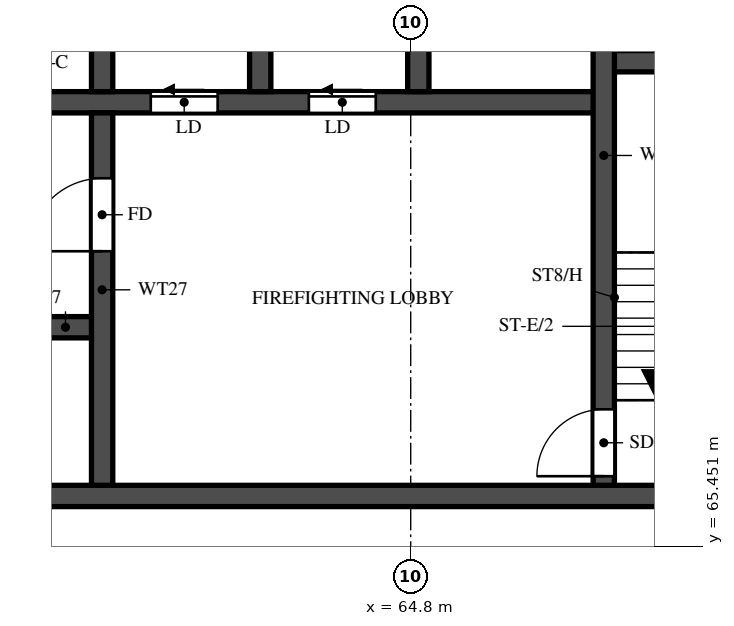
"""IFC4 building model, lengths in metres.
Left out: names, types, materials, properties, quantities, classifications, styles, units other than length and angle.
Written with IfcOpenShell. Run it as: python <this file> out.ifc"""

import sys

from ifc_helpers import new_model, si_unit, direction, frame, frame_2d, origin, place, context, subcontext, project, spatial, rectangle, extrude, element, fill, save


model = new_model("IFC4")
c1 = context("Model", 3, precision=1e-05, world=origin(), true_north=direction((0.0, 1.0)))
c2 = subcontext(c1, "Body", "Model", "MODEL_VIEW")
j1 = project(units=[si_unit("LENGTHUNIT", "METRE"), si_unit("PLANEANGLEUNIT", "RADIAN")], contexts=[c1])
p1 = place(None, origin())
s1 = spatial("IfcSite", under=j1, at=p1, CompositionType="ELEMENT")
p2 = place(p1, origin())
s2 = spatial("IfcBuilding", under=s1, at=p2, CompositionType="ELEMENT")
p3 = place(p2, frame((0.0, 0.0, 188.5)))
s3 = spatial("IfcBuildingStorey", under=s2, at=p3, CompositionType="ELEMENT", Elevation=188.5)
p4 = place(p3, frame((29.7, 66.275, 0.0), z_axis=(0.0, 0.0, 1.0), x_axis=(1.0, 0.0, 0.0)))
e1 = element("IfcWall", 1, at=p4, inside=s3, PredefinedType="SHEAR", context=c2, shape_type="SweptSolid", body=[
    extrude(rectangle(XDim=41.4, YDim=0.35, at=frame_2d((20.7, 0.0))), origin(), (0.0, 0.0, 1.0), 3.2),
])
p5 = place(p4, frame((0.925, 0.0, 0.0)))
e2 = element("IfcOpeningElement", 2, at=p5, cuts=e1, PredefinedType="OPENING", context=c2, shape_type="SweptSolid", body=[
    extrude(rectangle(XDim=1.1, YDim=2.1, at=frame_2d((0.55, 1.05))), frame((0.0, 0.185, 0.0), z_axis=(0.0, -1.0, 0.0), x_axis=(1.0, 0.0, 0.0)), (0.0, 0.0, 1.0), 0.37),
])
p6 = place(p4, frame((3.712, 0.0, 0.0)))
e3 = element("IfcOpeningElement", 3, at=p6, cuts=e1, PredefinedType="OPENING", context=c2, shape_type="SweptSolid", body=[
    extrude(rectangle(XDim=1.8, YDim=2.1, at=frame_2d((0.9, 1.05))), frame((0.0, 0.185, 0.0), z_axis=(0.0, -1.0, 0.0), x_axis=(1.0, 0.0, 0.0)), (0.0, 0.0, 1.0), 0.37),
])
p7 = place(p3, frame((35.625, 69.05, 0.0), z_axis=(0.0, 0.0, 1.0), x_axis=(1.0, 0.0, 0.0)))
e4 = element("IfcWall", 4, at=p7, inside=s3, PredefinedType="SHEAR", context=c2, shape_type="SweptSolid", body=[
    extrude(rectangle(XDim=24.1, YDim=0.35, at=frame_2d((12.05, 0.0))), origin(), (0.0, 0.0, 1.0), 3.2),
])
p8 = place(p7, frame((1.0, 0.0, 0.0)))
e5 = element("IfcOpeningElement", 5, at=p8, cuts=e4, PredefinedType="OPENING", context=c2, shape_type="SweptSolid", body=[
    extrude(rectangle(XDim=1.1, YDim=2.1, at=frame_2d((0.55, 1.05))), frame((0.0, 0.185, 0.0), z_axis=(0.0, -1.0, 0.0), x_axis=(1.0, 0.0, 0.0)), (0.0, 0.0, 1.0), 0.37),
])
p9 = place(p7, frame((3.75, 0.0, 0.0)))
e6 = element("IfcOpeningElement", 6, at=p9, cuts=e4, PredefinedType="OPENING", context=c2, shape_type="SweptSolid", body=[
    extrude(rectangle(XDim=1.1, YDim=2.1, at=frame_2d((0.55, 1.05))), frame((0.0, 0.185, 0.0), z_axis=(0.0, -1.0, 0.0), x_axis=(1.0, 0.0, 0.0)), (0.0, 0.0, 1.0), 0.37),
])
p10 = place(p7, frame((6.5, 0.0, 0.0)))
e7 = element("IfcOpeningElement", 7, at=p10, cuts=e4, PredefinedType="OPENING", context=c2, shape_type="SweptSolid", body=[
    extrude(rectangle(XDim=1.1, YDim=2.1, at=frame_2d((0.55, 1.05))), frame((0.0, 0.185, 0.0), z_axis=(0.0, -1.0, 0.0), x_axis=(1.0, 0.0, 0.0)), (0.0, 0.0, 1.0), 0.37),
])
p11 = place(p7, frame((9.25, 0.0, 0.0)))
e8 = element("IfcOpeningElement", 8, at=p11, cuts=e4, PredefinedType="OPENING", context=c2, shape_type="SweptSolid", body=[
    extrude(rectangle(XDim=1.1, YDim=2.1, at=frame_2d((0.55, 1.05))), frame((0.0, 0.185, 0.0), z_axis=(0.0, -1.0, 0.0), x_axis=(1.0, 0.0, 0.0)), (0.0, 0.0, 1.0), 0.37),
])
p12 = place(p7, frame((12.0, 0.0, 0.0)))
e9 = element("IfcOpeningElement", 9, at=p12, cuts=e4, PredefinedType="OPENING", context=c2, shape_type="SweptSolid", body=[
    extrude(rectangle(XDim=1.1, YDim=2.1, at=frame_2d((0.55, 1.05))), frame((0.0, 0.185, 0.0), z_axis=(0.0, -1.0, 0.0), x_axis=(1.0, 0.0, 0.0)), (0.0, 0.0, 1.0), 0.37),
])
p13 = place(p7, frame((14.75, 0.0, 0.0)))
e10 = element("IfcOpeningElement", 10, at=p13, cuts=e4, PredefinedType="OPENING", context=c2, shape_type="SweptSolid", body=[
    extrude(rectangle(XDim=1.1, YDim=2.1, at=frame_2d((0.55, 1.05))), frame((0.0, 0.185, 0.0), z_axis=(0.0, -1.0, 0.0), x_axis=(1.0, 0.0, 0.0)), (0.0, 0.0, 1.0), 0.37),
])
p14 = place(p7, frame((17.625, 0.0, 0.0)))
e11 = element("IfcOpeningElement", 11, at=p14, cuts=e4, PredefinedType="OPENING", context=c2, shape_type="SweptSolid", body=[
    extrude(rectangle(XDim=1.1, YDim=2.1, at=frame_2d((0.55, 1.05))), frame((0.0, 0.185, 0.0), z_axis=(0.0, -1.0, 0.0), x_axis=(1.0, 0.0, 0.0)), (0.0, 0.0, 1.0), 0.37),
])
p15 = place(p7, frame((20.625, 0.0, 0.0)))
e12 = element("IfcOpeningElement", 12, at=p15, cuts=e4, PredefinedType="OPENING", context=c2, shape_type="SweptSolid", body=[
    extrude(rectangle(XDim=1.1, YDim=2.1, at=frame_2d((0.55, 1.05))), frame((0.0, 0.185, 0.0), z_axis=(0.0, -1.0, 0.0), x_axis=(1.0, 0.0, 0.0)), (0.0, 0.0, 1.0), 0.37),
])
p16 = place(p3, frame((32.825, 72.75, 0.0), z_axis=(0.0, 0.0, 1.0), x_axis=(1.0, 0.0, 0.0)))
e13 = element("IfcWall", 13, at=p16, inside=s3, PredefinedType="SHEAR", context=c2, shape_type="SweptSolid", body=[
    extrude(rectangle(XDim=35.15, YDim=0.35, at=frame_2d((17.575, 0.0))), origin(), (0.0, 0.0, 1.0), 3.2),
])
p17 = place(p16, frame((19.8, 0.0, 0.0)))
e14 = element("IfcOpeningElement", 14, at=p17, cuts=e13, PredefinedType="OPENING", context=c2, shape_type="SweptSolid", body=[
    extrude(rectangle(XDim=1.1, YDim=2.1, at=frame_2d((0.55, 1.05))), frame((0.0, 0.185, 0.0), z_axis=(0.0, -1.0, 0.0), x_axis=(1.0, 0.0, 0.0)), (0.0, 0.0, 1.0), 0.37),
])
p18 = place(p16, frame((27.7, 0.0, 0.0)))
e15 = element("IfcOpeningElement", 15, at=p18, cuts=e13, PredefinedType="OPENING", context=c2, shape_type="SweptSolid", body=[
    extrude(rectangle(XDim=1.1, YDim=2.1, at=frame_2d((0.55, 1.05))), frame((0.0, 0.185, 0.0), z_axis=(0.0, -1.0, 0.0), x_axis=(1.0, 0.0, 0.0)), (0.0, 0.0, 1.0), 0.37),
])
p19 = place(p16, frame((30.3, 0.0, 0.0)))
e16 = element("IfcOpeningElement", 16, at=p19, cuts=e13, PredefinedType="OPENING", context=c2, shape_type="SweptSolid", body=[
    extrude(rectangle(XDim=1.1, YDim=2.1, at=frame_2d((0.55, 1.05))), frame((0.0, 0.185, 0.0), z_axis=(0.0, -1.0, 0.0), x_axis=(1.0, 0.0, 0.0)), (0.0, 0.0, 1.0), 0.37),
])
p20 = place(p16, frame((3.8, 0.0, 0.0)))
e17 = element("IfcOpeningElement", 17, at=p20, cuts=e13, PredefinedType="OPENING", context=c2, shape_type="SweptSolid", body=[
    extrude(rectangle(XDim=1.1, YDim=2.1, at=frame_2d((0.55, 1.05))), frame((0.0, 0.185, 0.0), z_axis=(0.0, -1.0, 0.0), x_axis=(1.0, 0.0, 0.0)), (0.0, 0.0, 1.0), 0.37),
])
p21 = place(p16, frame((6.55, 0.0, 0.0)))
e18 = element("IfcOpeningElement", 18, at=p21, cuts=e13, PredefinedType="OPENING", context=c2, shape_type="SweptSolid", body=[
    extrude(rectangle(XDim=1.1, YDim=2.1, at=frame_2d((0.55, 1.05))), frame((0.0, 0.185, 0.0), z_axis=(0.0, -1.0, 0.0), x_axis=(1.0, 0.0, 0.0)), (0.0, 0.0, 1.0), 0.37),
])
p22 = place(p16, frame((9.3, 0.0, 0.0)))
e19 = element("IfcOpeningElement", 19, at=p22, cuts=e13, PredefinedType="OPENING", context=c2, shape_type="SweptSolid", body=[
    extrude(rectangle(XDim=1.1, YDim=2.1, at=frame_2d((0.55, 1.05))), frame((0.0, 0.185, 0.0), z_axis=(0.0, -1.0, 0.0), x_axis=(1.0, 0.0, 0.0)), (0.0, 0.0, 1.0), 0.37),
])
p23 = place(p16, frame((12.05, 0.0, 0.0)))
e20 = element("IfcOpeningElement", 20, at=p23, cuts=e13, PredefinedType="OPENING", context=c2, shape_type="SweptSolid", body=[
    extrude(rectangle(XDim=1.1, YDim=2.1, at=frame_2d((0.55, 1.05))), frame((0.0, 0.185, 0.0), z_axis=(0.0, -1.0, 0.0), x_axis=(1.0, 0.0, 0.0)), (0.0, 0.0, 1.0), 0.37),
])
p24 = place(p16, frame((14.8, 0.0, 0.0)))
e21 = element("IfcOpeningElement", 21, at=p24, cuts=e13, PredefinedType="OPENING", context=c2, shape_type="SweptSolid", body=[
    extrude(rectangle(XDim=1.1, YDim=2.1, at=frame_2d((0.55, 1.05))), frame((0.0, 0.185, 0.0), z_axis=(0.0, -1.0, 0.0), x_axis=(1.0, 0.0, 0.0)), (0.0, 0.0, 1.0), 0.37),
])
p25 = place(p16, frame((17.55, 0.0, 0.0)))
e22 = element("IfcOpeningElement", 22, at=p25, cuts=e13, PredefinedType="OPENING", context=c2, shape_type="SweptSolid", body=[
    extrude(rectangle(XDim=1.1, YDim=2.1, at=frame_2d((0.55, 1.05))), frame((0.0, 0.185, 0.0), z_axis=(0.0, -1.0, 0.0), x_axis=(1.0, 0.0, 0.0)), (0.0, 0.0, 1.0), 0.37),
])
p26 = place(p16, frame((0.938, 0.0, 0.0)))
e23 = element("IfcOpeningElement", 23, at=p26, cuts=e13, PredefinedType="OPENING", context=c2, shape_type="SweptSolid", body=[
    extrude(rectangle(XDim=1.1, YDim=2.1, at=frame_2d((0.55, 1.05))), frame((0.0, 0.185, 0.0), z_axis=(0.0, -1.0, 0.0), x_axis=(1.0, 0.0, 0.0)), (0.0, 0.0, 1.0), 0.37),
])
p27 = place(p3, frame((67.975, 73.425, 0.0), z_axis=(0.0, 0.0, 1.0), x_axis=(1.0, 0.0, 0.0)))
e24 = element("IfcWall", 24, at=p27, inside=s3, PredefinedType="SHEAR", context=c2, shape_type="SweptSolid", body=[
    extrude(rectangle(XDim=3.125, YDim=0.35, at=frame_2d((1.562, 0.0))), origin(), (0.0, 0.0, 1.0), 3.2),
])
p28 = place(p3, frame((67.975, 66.45, 0.0), z_axis=(0.0, 0.0, 1.0), x_axis=(0.0, 1.0, 0.0)))
e25 = element("IfcWall", 25, at=p28, inside=s3, PredefinedType="SHEAR", context=c2, shape_type="SweptSolid", body=[
    extrude(rectangle(XDim=10.85, YDim=0.35, at=frame_2d((5.425, 0.0))), origin(), (0.0, 0.0, 1.0), 3.2),
])
p29 = place(p28, frame((0.15, 0.0, 0.0)))
e26 = element("IfcOpeningElement", 26, at=p29, cuts=e25, PredefinedType="OPENING", context=c2, shape_type="SweptSolid", body=[
    extrude(rectangle(XDim=1.1, YDim=2.1, at=frame_2d((0.55, 1.05))), frame((0.0, 0.185, 0.0), z_axis=(0.0, -1.0, 0.0), x_axis=(1.0, 0.0, 0.0)), (0.0, 0.0, 1.0), 0.37),
])
p30 = place(p3, frame((59.725, 66.45, 0.0), z_axis=(0.0, 0.0, 1.0), x_axis=(0.0, 1.0, 0.0)))
e27 = element("IfcWall", 27, at=p30, inside=s3, PredefinedType="SHEAR", context=c2, shape_type="SweptSolid", body=[
    extrude(rectangle(XDim=6.125, YDim=0.35, at=frame_2d((3.062, 0.0))), origin(), (0.0, 0.0, 1.0), 3.2),
])
p31 = place(p30, frame((3.85, 0.0, 0.0)))
e28 = element("IfcOpeningElement", 28, at=p31, cuts=e27, PredefinedType="OPENING", context=c2, shape_type="SweptSolid", body=[
    extrude(rectangle(XDim=1.2, YDim=2.1, at=frame_2d((0.6, 1.05))), frame((0.0, 0.185, 0.0), z_axis=(0.0, -1.0, 0.0), x_axis=(1.0, 0.0, 0.0)), (0.0, 0.0, 1.0), 0.37),
])
for number, where, z_axis, x_axis in (
    (29, (59.725, 72.925, 0.0), (0.0, 0.0, 1.0), (0.0, 1.0, 0.0)),
    (30, (62.325, 72.925, 0.0), (0.0, 0.0, 1.0), (0.0, 1.0, 0.0)),
    (31, (64.925, 72.925, 0.0), (0.0, 0.0, 1.0), (0.0, 1.0, 0.0)),
):
    element("IfcWall", number, at=place(p3, frame(where, z_axis=z_axis, x_axis=x_axis)), inside=s3, PredefinedType="SHEAR", context=c2, shape_type="SweptSolid", body=[
        extrude(rectangle(XDim=2.95, YDim=0.35, at=frame_2d((1.475, 0.0))), origin(), (0.0, 0.0, 1.0), 3.2),
    ])
p32 = place(p29, origin())
e32 = element("IfcDoor", 32, at=p32, inside=s3, OperationType="SINGLE_SWING_LEFT", PredefinedType="DOOR", context=c2, shape_type="SweptSolid", body=[
    extrude(rectangle(XDim=1.1, YDim=2.1, at=frame_2d((0.55, 1.05))), frame((0.0, 0.025, 0.0), z_axis=(0.0, -1.0, 0.0), x_axis=(1.0, 0.0, 0.0)), (0.0, 0.0, 1.0), 0.05),
])
fill(e26, e32)
p33 = place(p31, origin())
e33 = element("IfcDoor", 33, at=p33, inside=s3, OperationType="SINGLE_SWING_LEFT", PredefinedType="DOOR", context=c2, shape_type="SweptSolid", body=[
    extrude(rectangle(XDim=1.2, YDim=2.1, at=frame_2d((0.6, 1.05))), frame((0.0, 0.025, 0.0), z_axis=(0.0, -1.0, 0.0), x_axis=(1.0, 0.0, 0.0)), (0.0, 0.0, 1.0), 0.05),
])
fill(e28, e33)
p34 = place(p18, origin())
e34 = element("IfcDoor", 34, at=p34, inside=s3, OperationType="SLIDING_TO_LEFT", PredefinedType="DOOR", context=c2, shape_type="SweptSolid", body=[
    extrude(rectangle(XDim=1.1, YDim=2.1, at=frame_2d((0.55, 1.05))), frame((0.0, 0.025, 0.0), z_axis=(0.0, -1.0, 0.0), x_axis=(1.0, 0.0, 0.0)), (0.0, 0.0, 1.0), 0.05),
])
fill(e15, e34)
p35 = place(p19, origin())
e35 = element("IfcDoor", 35, at=p35, inside=s3, OperationType="SLIDING_TO_LEFT", PredefinedType="DOOR", context=c2, shape_type="SweptSolid", body=[
    extrude(rectangle(XDim=1.1, YDim=2.1, at=frame_2d((0.55, 1.05))), frame((0.0, 0.025, 0.0), z_axis=(0.0, -1.0, 0.0), x_axis=(1.0, 0.0, 0.0)), (0.0, 0.0, 1.0), 0.05),
])
fill(e16, e35)
save(model, sys.argv[1])
